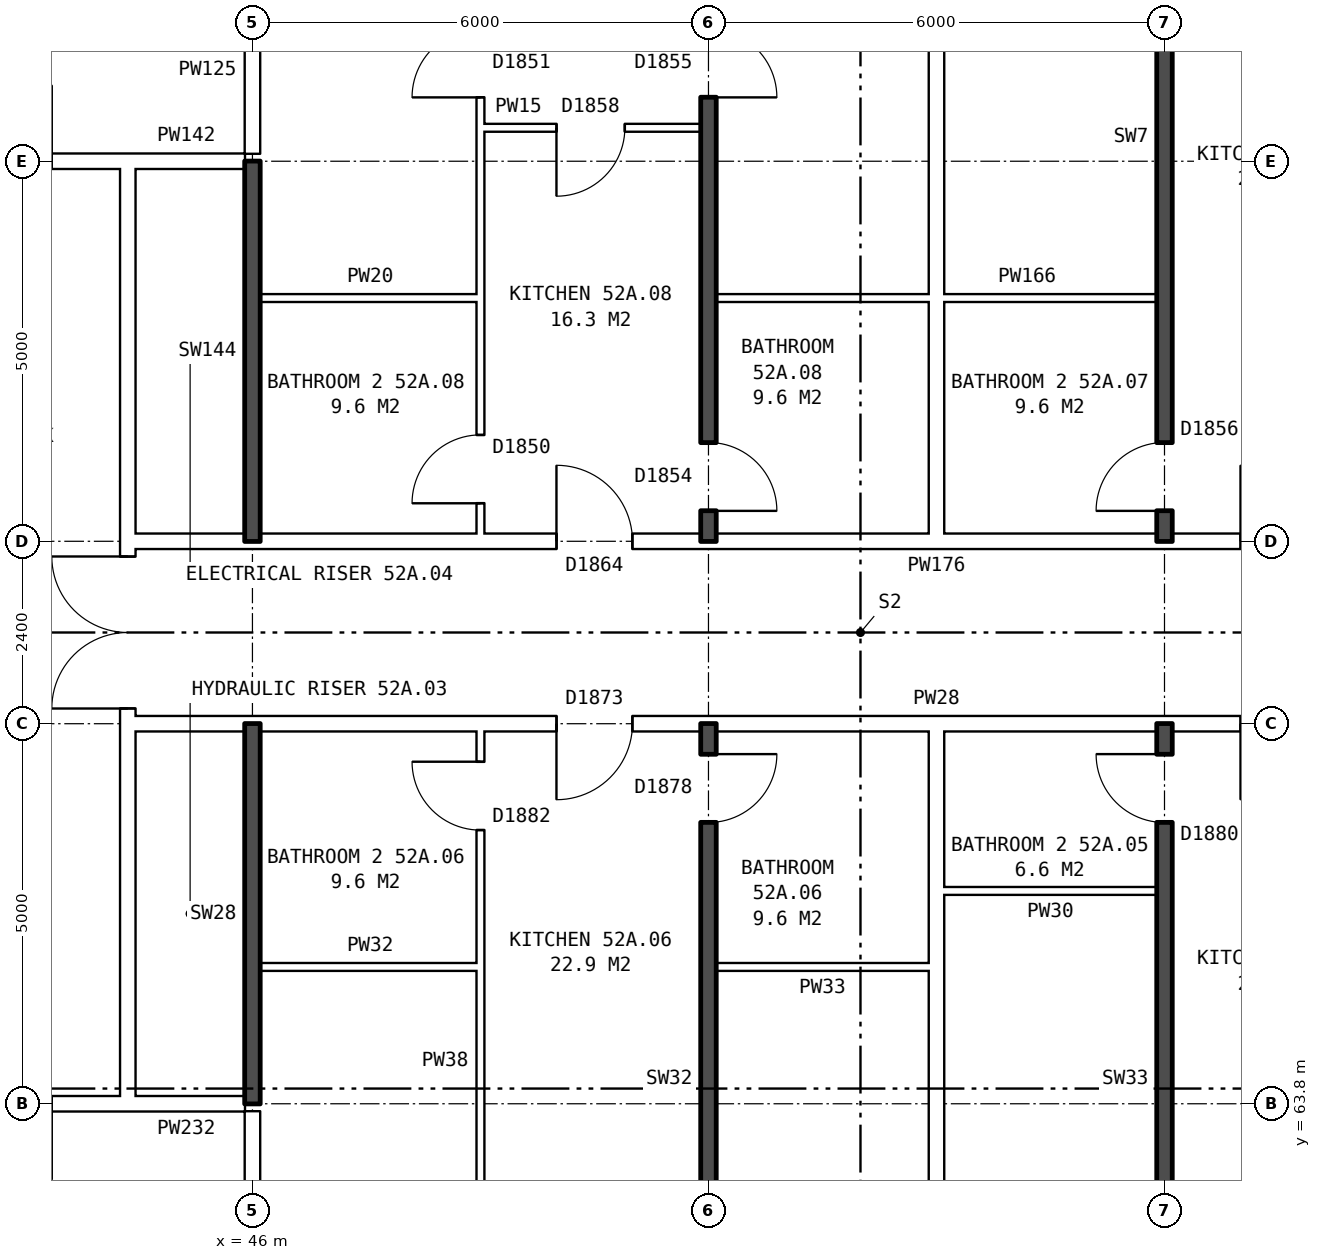
"""IFC4 building model, lengths in metres.
Left out: names, types, materials, properties, quantities, classifications, styles, units other than length and angle.
Written with IfcOpenShell. Run it as: python <this file> out.ifc"""

import sys

from ifc_helpers import new_model, si_unit, direction, frame, frame_2d, origin, place, context, subcontext, project, spatial, rectangle, extrude, element, fill, save


model = new_model("IFC4")
c1 = context("Model", 3, precision=1e-05, world=origin(), true_north=direction((0.0, 1.0)))
c2 = subcontext(c1, "Body", "Model", "MODEL_VIEW")
j1 = project(units=[si_unit("LENGTHUNIT", "METRE"), si_unit("PLANEANGLEUNIT", "RADIAN")], contexts=[c1])
p1 = place(None, origin())
s1 = spatial("IfcSite", under=j1, at=p1, CompositionType="ELEMENT")
p2 = place(p1, origin())
s2 = spatial("IfcBuilding", under=s1, at=p2, CompositionType="ELEMENT")
p3 = place(p2, frame((0.0, 0.0, 185.1)))
s3 = spatial("IfcBuildingStorey", under=s2, at=p3, CompositionType="ELEMENT", Elevation=185.1)
p4 = place(p3, frame((44.36, 63.9, 0.0), z_axis=(0.0, 0.0, 1.0), x_axis=(0.0, 1.0, 0.0)))
e1 = element("IfcWall", 1, at=p4, inside=s3, PredefinedType="PARTITIONING", context=c2, shape_type="SweptSolid", body=[
    extrude(rectangle(XDim=12.2, YDim=0.2, at=frame_2d((6.1, 0.0))), origin(), (0.0, 0.0, 1.0), 2.85),
])
p5 = place(p4, frame((5.1, 0.0, 0.0)))
e2 = element("IfcOpeningElement", 2, at=p5, cuts=e1, PredefinedType="OPENING", context=c2, shape_type="SweptSolid", body=[
    extrude(rectangle(XDim=2.0, YDim=2.1, at=frame_2d((1.0, 1.05))), frame((0.0, 0.11, 0.0), z_axis=(0.0, -1.0, 0.0), x_axis=(1.0, 0.0, 0.0)), (0.0, 0.0, 1.0), 0.22),
])
p6 = place(p3, frame((41.36, 63.8, 0.0), z_axis=(0.0, 0.0, 1.0), x_axis=(1.0, 0.0, 0.0)))
e3 = element("IfcWall", 3, at=p6, inside=s3, PredefinedType="PARTITIONING", context=c2, shape_type="SweptSolid", body=[
    extrude(rectangle(XDim=3.0, YDim=0.2, at=frame_2d((1.5, 0.0))), origin(), (0.0, 0.0, 1.0), 2.85),
])
p7 = place(p6, frame((1.0, 0.0, 0.0)))
e4 = element("IfcOpeningElement", 4, at=p7, cuts=e3, PredefinedType="OPENING", context=c2, shape_type="SweptSolid", body=[
    extrude(rectangle(XDim=1.0, YDim=2.1, at=frame_2d((0.5, 1.05))), frame((0.0, 0.11, 0.0), z_axis=(0.0, -1.0, 0.0), x_axis=(1.0, 0.0, 0.0)), (0.0, 0.0, 1.0), 0.22),
])
p8 = place(p3, frame((44.36, 63.8, 0.0), z_axis=(0.0, 0.0, 1.0), x_axis=(1.0, 0.0, 0.0)))
e5 = element("IfcWall", 5, at=p8, inside=s3, PredefinedType="PARTITIONING", context=c2, shape_type="SweptSolid", body=[
    extrude(rectangle(XDim=1.54, YDim=0.2, at=frame_2d((0.77, 0.0))), origin(), (0.0, 0.0, 1.0), 2.85),
])
p9 = place(p3, frame((46.1, 65.6, 0.0), z_axis=(0.0, 0.0, 1.0), x_axis=(1.0, 0.0, 0.0)))
e6 = element("IfcWall", 6, at=p9, inside=s3, PredefinedType="PARTITIONING", context=c2, shape_type="SweptSolid", body=[
    extrude(rectangle(XDim=2.9, YDim=0.1, at=frame_2d((1.45, 0.0))), origin(), (0.0, 0.0, 1.0), 2.85),
])
for number, where, z_axis, x_axis in (
    (7, (52.1, 65.6, 0.0), (0.0, 0.0, 1.0), (1.0, 0.0, 0.0)),
    (8, (55.1, 66.6, 0.0), (0.0, 0.0, 1.0), (1.0, 0.0, 0.0)),
):
    element("IfcWall", number, at=place(p3, frame(where, z_axis=z_axis, x_axis=x_axis)), inside=s3, PredefinedType="PARTITIONING", context=c2, shape_type="SweptSolid", body=[
        extrude(rectangle(XDim=2.8, YDim=0.1, at=frame_2d((1.4, 0.0))), origin(), (0.0, 0.0, 1.0), 2.85),
    ])
p10 = place(p3, frame((44.36, 68.8, 0.0), z_axis=(0.0, 0.0, 1.0), x_axis=(1.0, 0.0, 0.0)))
e9 = element("IfcWall", 9, at=p10, inside=s3, PredefinedType="PARTITIONING", context=c2, shape_type="SweptSolid", body=[
    extrude(rectangle(XDim=19.28, YDim=0.2, at=frame_2d((9.64, 0.0))), origin(), (0.0, 0.0, 1.0), 2.85),
])
p11 = place(p10, frame((14.64, 0.0, 0.0)))
e10 = element("IfcOpeningElement", 10, at=p11, cuts=e9, PredefinedType="OPENING", context=c2, shape_type="SweptSolid", body=[
    extrude(rectangle(XDim=1.0, YDim=2.1, at=frame_2d((0.5, 1.05))), frame((0.0, 0.11, 0.0), z_axis=(0.0, -1.0, 0.0), x_axis=(1.0, 0.0, 0.0)), (0.0, 0.0, 1.0), 0.22),
])
p12 = place(p10, frame((5.64, 0.0, 0.0)))
e11 = element("IfcOpeningElement", 11, at=p12, cuts=e9, PredefinedType="OPENING", context=c2, shape_type="SweptSolid", body=[
    extrude(rectangle(XDim=1.0, YDim=2.1, at=frame_2d((0.5, 1.05))), frame((0.0, 0.11, 0.0), z_axis=(0.0, -1.0, 0.0), x_axis=(1.0, 0.0, 0.0)), (0.0, 0.0, 1.0), 0.22),
])
p13 = place(p3, frame((44.36, 71.2, 0.0), z_axis=(0.0, 0.0, 1.0), x_axis=(1.0, 0.0, 0.0)))
e12 = element("IfcWall", 12, at=p13, inside=s3, PredefinedType="PARTITIONING", context=c2, shape_type="SweptSolid", body=[
    extrude(rectangle(XDim=19.28, YDim=0.2, at=frame_2d((9.64, 0.0))), origin(), (0.0, 0.0, 1.0), 2.85),
])
p14 = place(p13, frame((14.64, 0.0, 0.0)))
e13 = element("IfcOpeningElement", 13, at=p14, cuts=e12, PredefinedType="OPENING", context=c2, shape_type="SweptSolid", body=[
    extrude(rectangle(XDim=1.0, YDim=2.1, at=frame_2d((0.5, 1.05))), frame((0.0, 0.11, 0.0), z_axis=(0.0, -1.0, 0.0), x_axis=(1.0, 0.0, 0.0)), (0.0, 0.0, 1.0), 0.22),
])
p15 = place(p13, frame((5.64, 0.0, 0.0)))
e14 = element("IfcOpeningElement", 14, at=p15, cuts=e12, PredefinedType="OPENING", context=c2, shape_type="SweptSolid", body=[
    extrude(rectangle(XDim=1.0, YDim=2.1, at=frame_2d((0.5, 1.05))), frame((0.0, 0.11, 0.0), z_axis=(0.0, -1.0, 0.0), x_axis=(1.0, 0.0, 0.0)), (0.0, 0.0, 1.0), 0.22),
])
p16 = place(p3, frame((46.1, 74.4, 0.0), z_axis=(0.0, 0.0, 1.0), x_axis=(1.0, 0.0, 0.0)))
e15 = element("IfcWall", 15, at=p16, inside=s3, PredefinedType="PARTITIONING", context=c2, shape_type="SweptSolid", body=[
    extrude(rectangle(XDim=2.9, YDim=0.1, at=frame_2d((1.45, 0.0))), origin(), (0.0, 0.0, 1.0), 2.85),
])
p17 = place(p3, frame((52.1, 74.4, 0.0), z_axis=(0.0, 0.0, 1.0), x_axis=(1.0, 0.0, 0.0)))
e16 = element("IfcWall", 16, at=p17, inside=s3, PredefinedType="PARTITIONING", context=c2, shape_type="SweptSolid", body=[
    extrude(rectangle(XDim=5.8, YDim=0.1, at=frame_2d((2.9, 0.0))), origin(), (0.0, 0.0, 1.0), 2.85),
])
p18 = place(p3, frame((41.36, 76.2, 0.0), z_axis=(0.0, 0.0, 1.0), x_axis=(1.0, 0.0, 0.0)))
e17 = element("IfcWall", 17, at=p18, inside=s3, PredefinedType="PARTITIONING", context=c2, shape_type="SweptSolid", body=[
    extrude(rectangle(XDim=3.0, YDim=0.2, at=frame_2d((1.5, 0.0))), origin(), (0.0, 0.0, 1.0), 2.85),
])
p19 = place(p18, frame((1.0, 0.0, 0.0)))
e18 = element("IfcOpeningElement", 18, at=p19, cuts=e17, PredefinedType="OPENING", context=c2, shape_type="SweptSolid", body=[
    extrude(rectangle(XDim=1.0, YDim=2.1, at=frame_2d((0.5, 1.05))), frame((0.0, 0.11, 0.0), z_axis=(0.0, -1.0, 0.0), x_axis=(1.0, 0.0, 0.0)), (0.0, 0.0, 1.0), 0.22),
])
p20 = place(p3, frame((44.36, 76.2, 0.0), z_axis=(0.0, 0.0, 1.0), x_axis=(1.0, 0.0, 0.0)))
e19 = element("IfcWall", 19, at=p20, inside=s3, PredefinedType="PARTITIONING", context=c2, shape_type="SweptSolid", body=[
    extrude(rectangle(XDim=1.54, YDim=0.2, at=frame_2d((0.77, 0.0))), origin(), (0.0, 0.0, 1.0), 2.85),
])
p21 = place(p3, frame((49.0, 76.64, 0.0), z_axis=(0.0, 0.0, 1.0), x_axis=(1.0, 0.0, 0.0)))
e20 = element("IfcWall", 20, at=p21, inside=s3, PredefinedType="PARTITIONING", context=c2, shape_type="SweptSolid", body=[
    extrude(rectangle(XDim=2.9, YDim=0.1, at=frame_2d((1.45, 0.0))), origin(), (0.0, 0.0, 1.0), 2.85),
])
p22 = place(p21, frame((1.0, 0.0, 0.0)))
e21 = element("IfcOpeningElement", 21, at=p22, cuts=e20, PredefinedType="OPENING", context=c2, shape_type="SweptSolid", body=[
    extrude(rectangle(XDim=0.9, YDim=2.1, at=frame_2d((0.45, 1.05))), frame((0.0, 0.06, 0.0), z_axis=(0.0, -1.0, 0.0), x_axis=(1.0, 0.0, 0.0)), (0.0, 0.0, 1.0), 0.12),
])
p23 = place(p3, frame((46.0, 61.5, 0.0), z_axis=(0.0, 0.0, 1.0), x_axis=(0.0, 1.0, 0.0)))
e22 = element("IfcWall", 22, at=p23, inside=s3, PredefinedType="PARTITIONING", context=c2, shape_type="SweptSolid", body=[
    extrude(rectangle(XDim=2.2, YDim=0.2, at=frame_2d((1.1, 0.0))), origin(), (0.0, 0.0, 1.0), 2.85),
])
for number, where, z_axis, x_axis in (
    (23, (46.0, 63.8, 0.0), (0.0, 0.0, 1.0), (0.0, 1.0, 0.0)),
    (24, (46.0, 71.2, 0.0), (0.0, 0.0, 1.0), (0.0, 1.0, 0.0)),
):
    element("IfcWall", number, at=place(p3, frame(where, z_axis=z_axis, x_axis=x_axis)), inside=s3, PredefinedType="SOLIDWALL", context=c2, shape_type="SweptSolid", body=[
        extrude(rectangle(XDim=5.0, YDim=0.2, at=frame_2d((2.5, 0.0))), origin(), (0.0, 0.0, 1.0), 2.85),
    ])
p24 = place(p3, frame((46.0, 76.3, 0.0), z_axis=(0.0, 0.0, 1.0), x_axis=(0.0, 1.0, 0.0)))
e25 = element("IfcWall", 25, at=p24, inside=s3, PredefinedType="PARTITIONING", context=c2, shape_type="SweptSolid", body=[
    extrude(rectangle(XDim=2.2, YDim=0.2, at=frame_2d((1.1, 0.0))), origin(), (0.0, 0.0, 1.0), 2.85),
])
p25 = place(p3, frame((49.0, 54.36, 0.0), z_axis=(0.0, 0.0, 1.0), x_axis=(0.0, 1.0, 0.0)))
e26 = element("IfcWall", 26, at=p25, inside=s3, PredefinedType="PARTITIONING", context=c2, shape_type="SweptSolid", body=[
    extrude(rectangle(XDim=14.34, YDim=0.1, at=frame_2d((7.17, 0.0))), origin(), (0.0, 0.0, 1.0), 2.85),
])
p26 = place(p25, frame((5.5, 0.0, 0.0)))
e27 = element("IfcOpeningElement", 27, at=p26, cuts=e26, PredefinedType="OPENING", context=c2, shape_type="SweptSolid", body=[
    extrude(rectangle(XDim=0.9, YDim=2.1, at=frame_2d((0.45, 1.05))), frame((0.0, 0.06, 0.0), z_axis=(0.0, -1.0, 0.0), x_axis=(1.0, 0.0, 0.0)), (0.0, 0.0, 1.0), 0.12),
])
p27 = place(p25, frame((13.04, 0.0, 0.0)))
e28 = element("IfcOpeningElement", 28, at=p27, cuts=e26, PredefinedType="OPENING", context=c2, shape_type="SweptSolid", body=[
    extrude(rectangle(XDim=0.9, YDim=2.1, at=frame_2d((0.45, 1.05))), frame((0.0, 0.06, 0.0), z_axis=(0.0, -1.0, 0.0), x_axis=(1.0, 0.0, 0.0)), (0.0, 0.0, 1.0), 0.12),
])
p28 = place(p3, frame((49.0, 71.3, 0.0), z_axis=(0.0, 0.0, 1.0), x_axis=(0.0, 1.0, 0.0)))
e29 = element("IfcWall", 29, at=p28, inside=s3, PredefinedType="PARTITIONING", context=c2, shape_type="SweptSolid", body=[
    extrude(rectangle(XDim=14.34, YDim=0.1, at=frame_2d((7.17, 0.0))), origin(), (0.0, 0.0, 1.0), 2.85),
])
p29 = place(p28, frame((5.74, 0.0, 0.0)))
e30 = element("IfcOpeningElement", 30, at=p29, cuts=e29, PredefinedType="OPENING", context=c2, shape_type="SweptSolid", body=[
    extrude(rectangle(XDim=0.9, YDim=2.1, at=frame_2d((0.45, 1.05))), frame((0.0, 0.06, 0.0), z_axis=(0.0, -1.0, 0.0), x_axis=(1.0, 0.0, 0.0)), (0.0, 0.0, 1.0), 0.12),
])
p30 = place(p28, frame((0.4, 0.0, 0.0)))
e31 = element("IfcOpeningElement", 31, at=p30, cuts=e29, PredefinedType="OPENING", context=c2, shape_type="SweptSolid", body=[
    extrude(rectangle(XDim=0.9, YDim=2.1, at=frame_2d((0.45, 1.05))), frame((0.0, 0.06, 0.0), z_axis=(0.0, -1.0, 0.0), x_axis=(1.0, 0.0, 0.0)), (0.0, 0.0, 1.0), 0.12),
])
p31 = place(p3, frame((52.0, 54.36, 0.0), z_axis=(0.0, 0.0, 1.0), x_axis=(0.0, 1.0, 0.0)))
e32 = element("IfcWall", 32, at=p31, inside=s3, PredefinedType="SOLIDWALL", context=c2, shape_type="SweptSolid", body=[
    extrude(rectangle(XDim=14.44, YDim=0.2, at=frame_2d((7.22, 0.0))), origin(), (0.0, 0.0, 1.0), 2.85),
])
p32 = place(p31, frame((5.5, 0.0, 0.0)))
e33 = element("IfcOpeningElement", 33, at=p32, cuts=e32, PredefinedType="OPENING", context=c2, shape_type="SweptSolid", body=[
    extrude(rectangle(XDim=0.9, YDim=2.1, at=frame_2d((0.45, 1.05))), frame((0.0, 0.11, 0.0), z_axis=(0.0, -1.0, 0.0), x_axis=(1.0, 0.0, 0.0)), (0.0, 0.0, 1.0), 0.22),
])
p33 = place(p31, frame((13.14, 0.0, 0.0)))
e34 = element("IfcOpeningElement", 34, at=p33, cuts=e32, PredefinedType="OPENING", context=c2, shape_type="SweptSolid", body=[
    extrude(rectangle(XDim=0.9, YDim=2.1, at=frame_2d((0.45, 1.05))), frame((0.0, 0.11, 0.0), z_axis=(0.0, -1.0, 0.0), x_axis=(1.0, 0.0, 0.0)), (0.0, 0.0, 1.0), 0.22),
])
p34 = place(p3, frame((52.0, 71.2, 0.0), z_axis=(0.0, 0.0, 1.0), x_axis=(0.0, 1.0, 0.0)))
e35 = element("IfcWall", 35, at=p34, inside=s3, PredefinedType="SOLIDWALL", context=c2, shape_type="SweptSolid", body=[
    extrude(rectangle(XDim=14.44, YDim=0.2, at=frame_2d((7.22, 0.0))), origin(), (0.0, 0.0, 1.0), 2.85),
])
p35 = place(p34, frame((5.84, 0.0, 0.0)))
e36 = element("IfcOpeningElement", 36, at=p35, cuts=e35, PredefinedType="OPENING", context=c2, shape_type="SweptSolid", body=[
    extrude(rectangle(XDim=0.9, YDim=2.1, at=frame_2d((0.45, 1.05))), frame((0.0, 0.11, 0.0), z_axis=(0.0, -1.0, 0.0), x_axis=(1.0, 0.0, 0.0)), (0.0, 0.0, 1.0), 0.22),
])
p36 = place(p34, frame((0.4, 0.0, 0.0)))
e37 = element("IfcOpeningElement", 37, at=p36, cuts=e35, PredefinedType="OPENING", context=c2, shape_type="SweptSolid", body=[
    extrude(rectangle(XDim=0.9, YDim=2.1, at=frame_2d((0.45, 1.05))), frame((0.0, 0.11, 0.0), z_axis=(0.0, -1.0, 0.0), x_axis=(1.0, 0.0, 0.0)), (0.0, 0.0, 1.0), 0.22),
])
for number, where, z_axis, x_axis in (
    (38, (55.0, 54.36, 0.0), (0.0, 0.0, 1.0), (0.0, 1.0, 0.0)),
    (39, (55.0, 71.3, 0.0), (0.0, 0.0, 1.0), (0.0, 1.0, 0.0)),
):
    element("IfcWall", number, at=place(p3, frame(where, z_axis=z_axis, x_axis=x_axis)), inside=s3, PredefinedType="PARTITIONING", context=c2, shape_type="SweptSolid", body=[
        extrude(rectangle(XDim=14.34, YDim=0.2, at=frame_2d((7.17, 0.0))), origin(), (0.0, 0.0, 1.0), 2.85),
    ])
p37 = place(p3, frame((58.0, 54.36, 0.0), z_axis=(0.0, 0.0, 1.0), x_axis=(0.0, 1.0, 0.0)))
e40 = element("IfcWall", 40, at=p37, inside=s3, PredefinedType="SOLIDWALL", context=c2, shape_type="SweptSolid", body=[
    extrude(rectangle(XDim=14.44, YDim=0.2, at=frame_2d((7.22, 0.0))), origin(), (0.0, 0.0, 1.0), 2.85),
])
p38 = place(p37, frame((5.5, 0.0, 0.0)))
e41 = element("IfcOpeningElement", 41, at=p38, cuts=e40, PredefinedType="OPENING", context=c2, shape_type="SweptSolid", body=[
    extrude(rectangle(XDim=0.9, YDim=2.1, at=frame_2d((0.45, 1.05))), frame((0.0, 0.11, 0.0), z_axis=(0.0, -1.0, 0.0), x_axis=(1.0, 0.0, 0.0)), (0.0, 0.0, 1.0), 0.22),
])
p39 = place(p37, frame((13.14, 0.0, 0.0)))
e42 = element("IfcOpeningElement", 42, at=p39, cuts=e40, PredefinedType="OPENING", context=c2, shape_type="SweptSolid", body=[
    extrude(rectangle(XDim=0.9, YDim=2.1, at=frame_2d((0.45, 1.05))), frame((0.0, 0.11, 0.0), z_axis=(0.0, -1.0, 0.0), x_axis=(1.0, 0.0, 0.0)), (0.0, 0.0, 1.0), 0.22),
])
p40 = place(p3, frame((58.0, 71.2, 0.0), z_axis=(0.0, 0.0, 1.0), x_axis=(0.0, 1.0, 0.0)))
e43 = element("IfcWall", 43, at=p40, inside=s3, PredefinedType="SOLIDWALL", context=c2, shape_type="SweptSolid", body=[
    extrude(rectangle(XDim=14.44, YDim=0.2, at=frame_2d((7.22, 0.0))), origin(), (0.0, 0.0, 1.0), 2.85),
])
p41 = place(p40, frame((9.34, 0.0, 0.0)))
e44 = element("IfcOpeningElement", 44, at=p41, cuts=e43, PredefinedType="OPENING", context=c2, shape_type="SweptSolid", body=[
    extrude(rectangle(XDim=0.9, YDim=2.1, at=frame_2d((0.45, 1.05))), frame((0.0, 0.11, 0.0), z_axis=(0.0, -1.0, 0.0), x_axis=(1.0, 0.0, 0.0)), (0.0, 0.0, 1.0), 0.22),
])
p42 = place(p40, frame((0.4, 0.0, 0.0)))
e45 = element("IfcOpeningElement", 45, at=p42, cuts=e43, PredefinedType="OPENING", context=c2, shape_type="SweptSolid", body=[
    extrude(rectangle(XDim=0.9, YDim=2.1, at=frame_2d((0.45, 1.05))), frame((0.0, 0.11, 0.0), z_axis=(0.0, -1.0, 0.0), x_axis=(1.0, 0.0, 0.0)), (0.0, 0.0, 1.0), 0.22),
])
p43 = place(p5, origin())
e46 = element("IfcDoor", 46, at=p43, inside=s3, OperationType="DOUBLE_DOOR_SINGLE_SWING", PredefinedType="DOOR", context=c2, shape_type="SweptSolid", body=[
    extrude(rectangle(XDim=2.0, YDim=2.1, at=frame_2d((1.0, 1.05))), frame((0.0, 0.025, 0.0), z_axis=(0.0, -1.0, 0.0), x_axis=(1.0, 0.0, 0.0)), (0.0, 0.0, 1.0), 0.05),
])
fill(e2, e46)
p44 = place(p39, origin())
e47 = element("IfcDoor", 47, at=p44, inside=s3, OperationType="SINGLE_SWING_RIGHT", PredefinedType="DOOR", context=c2, shape_type="SweptSolid", body=[
    extrude(rectangle(XDim=0.9, YDim=2.1, at=frame_2d((0.45, 1.05))), frame((0.0, 0.025, 0.0), z_axis=(0.0, -1.0, 0.0), x_axis=(1.0, 0.0, 0.0)), (0.0, 0.0, 1.0), 0.05),
])
fill(e42, e47)
p45 = place(p12, frame((1.0, 0.0, 0.0), z_axis=(0.0, 0.0, 1.0), x_axis=(-1.0, 0.0, 0.0)))
e48 = element("IfcDoor", 48, at=p45, inside=s3, OperationType="SINGLE_SWING_RIGHT", PredefinedType="DOOR", context=c2, shape_type="SweptSolid", body=[
    extrude(rectangle(XDim=1.0, YDim=2.1, at=frame_2d((0.5, 1.05))), frame((0.0, 0.025, 0.0), z_axis=(0.0, -1.0, 0.0), x_axis=(1.0, 0.0, 0.0)), (0.0, 0.0, 1.0), 0.05),
])
fill(e11, e48)
p46 = place(p33, frame((0.9, 0.0, 0.0), z_axis=(0.0, 0.0, 1.0), x_axis=(-1.0, 0.0, 0.0)))
e49 = element("IfcDoor", 49, at=p46, inside=s3, OperationType="SINGLE_SWING_LEFT", PredefinedType="DOOR", context=c2, shape_type="SweptSolid", body=[
    extrude(rectangle(XDim=0.9, YDim=2.1, at=frame_2d((0.45, 1.05))), frame((0.0, 0.025, 0.0), z_axis=(0.0, -1.0, 0.0), x_axis=(1.0, 0.0, 0.0)), (0.0, 0.0, 1.0), 0.05),
])
fill(e34, e49)
p47 = place(p27, origin())
e50 = element("IfcDoor", 50, at=p47, inside=s3, OperationType="SINGLE_SWING_RIGHT", PredefinedType="DOOR", context=c2, shape_type="SweptSolid", body=[
    extrude(rectangle(XDim=0.9, YDim=2.1, at=frame_2d((0.45, 1.05))), frame((0.0, 0.025, 0.0), z_axis=(0.0, -1.0, 0.0), x_axis=(1.0, 0.0, 0.0)), (0.0, 0.0, 1.0), 0.05),
])
fill(e28, e50)
p48 = place(p42, origin())
e51 = element("IfcDoor", 51, at=p48, inside=s3, OperationType="SINGLE_SWING_LEFT", PredefinedType="DOOR", context=c2, shape_type="SweptSolid", body=[
    extrude(rectangle(XDim=0.9, YDim=2.1, at=frame_2d((0.45, 1.05))), frame((0.0, 0.025, 0.0), z_axis=(0.0, -1.0, 0.0), x_axis=(1.0, 0.0, 0.0)), (0.0, 0.0, 1.0), 0.05),
])
fill(e45, e51)
p49 = place(p35, frame((0.9, 0.0, 0.0), z_axis=(0.0, 0.0, 1.0), x_axis=(-1.0, 0.0, 0.0)))
e52 = element("IfcDoor", 52, at=p49, inside=s3, OperationType="SINGLE_SWING_RIGHT", PredefinedType="DOOR", context=c2, shape_type="SweptSolid", body=[
    extrude(rectangle(XDim=0.9, YDim=2.1, at=frame_2d((0.45, 1.05))), frame((0.0, 0.025, 0.0), z_axis=(0.0, -1.0, 0.0), x_axis=(1.0, 0.0, 0.0)), (0.0, 0.0, 1.0), 0.05),
])
fill(e36, e52)
p50 = place(p29, origin())
e53 = element("IfcDoor", 53, at=p50, inside=s3, OperationType="SINGLE_SWING_LEFT", PredefinedType="DOOR", context=c2, shape_type="SweptSolid", body=[
    extrude(rectangle(XDim=0.9, YDim=2.1, at=frame_2d((0.45, 1.05))), frame((0.0, 0.025, 0.0), z_axis=(0.0, -1.0, 0.0), x_axis=(1.0, 0.0, 0.0)), (0.0, 0.0, 1.0), 0.05),
])
fill(e30, e53)
p51 = place(p15, origin())
e54 = element("IfcDoor", 54, at=p51, inside=s3, OperationType="SINGLE_SWING_LEFT", PredefinedType="DOOR", context=c2, shape_type="SweptSolid", body=[
    extrude(rectangle(XDim=1.0, YDim=2.1, at=frame_2d((0.5, 1.05))), frame((0.0, 0.025, 0.0), z_axis=(0.0, -1.0, 0.0), x_axis=(1.0, 0.0, 0.0)), (0.0, 0.0, 1.0), 0.05),
])
fill(e14, e54)
p52 = place(p22, frame((0.9, 0.0, 0.0), z_axis=(0.0, 0.0, 1.0), x_axis=(-1.0, 0.0, 0.0)))
e55 = element("IfcDoor", 55, at=p52, inside=s3, OperationType="SINGLE_SWING_RIGHT", PredefinedType="DOOR", context=c2, shape_type="SweptSolid", body=[
    extrude(rectangle(XDim=0.9, YDim=2.1, at=frame_2d((0.45, 1.05))), frame((0.0, 0.025, 0.0), z_axis=(0.0, -1.0, 0.0), x_axis=(1.0, 0.0, 0.0)), (0.0, 0.0, 1.0), 0.05),
])
fill(e21, e55)
p53 = place(p36, frame((0.9, 0.0, 0.0), z_axis=(0.0, 0.0, 1.0), x_axis=(-1.0, 0.0, 0.0)))
e56 = element("IfcDoor", 56, at=p53, inside=s3, OperationType="SINGLE_SWING_RIGHT", PredefinedType="DOOR", context=c2, shape_type="SweptSolid", body=[
    extrude(rectangle(XDim=0.9, YDim=2.1, at=frame_2d((0.45, 1.05))), frame((0.0, 0.025, 0.0), z_axis=(0.0, -1.0, 0.0), x_axis=(1.0, 0.0, 0.0)), (0.0, 0.0, 1.0), 0.05),
])
fill(e37, e56)
p54 = place(p30, origin())
e57 = element("IfcDoor", 57, at=p54, inside=s3, OperationType="SINGLE_SWING_LEFT", PredefinedType="DOOR", context=c2, shape_type="SweptSolid", body=[
    extrude(rectangle(XDim=0.9, YDim=2.1, at=frame_2d((0.45, 1.05))), frame((0.0, 0.025, 0.0), z_axis=(0.0, -1.0, 0.0), x_axis=(1.0, 0.0, 0.0)), (0.0, 0.0, 1.0), 0.05),
])
fill(e31, e57)
save(model, sys.argv[1])
